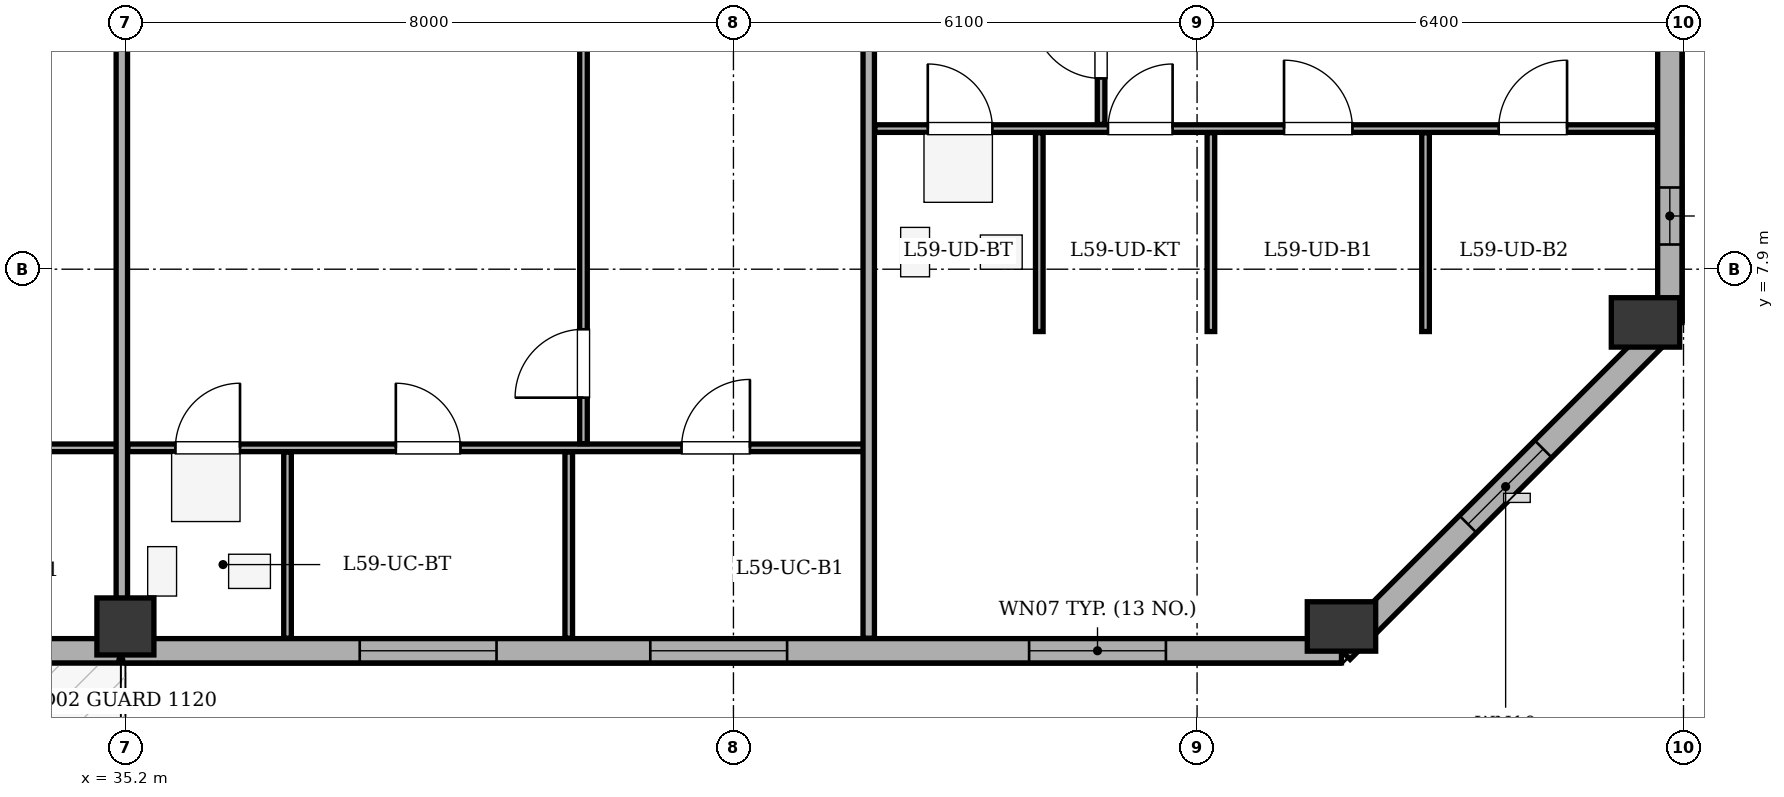
"""IFC4 building model, lengths in metres.
Left out: names, types, materials, properties, quantities, classifications, styles, units other than length and angle.
Written with IfcOpenShell. Run it as: python <this file> out.ifc"""

import sys

from ifc_helpers import new_model, si_unit, direction, frame, frame_2d, origin, origin_2d, place, context, subcontext, project, spatial, rectangle, extrude, element, fill, save


model = new_model("IFC4")
c1 = context("Model", 3, precision=1e-05, world=origin(), true_north=direction((0.0, 1.0)))
c2 = subcontext(c1, "Body", "Model", "MODEL_VIEW")
j1 = project(units=[si_unit("LENGTHUNIT", "METRE"), si_unit("PLANEANGLEUNIT", "RADIAN")], contexts=[c1])
p1 = place(None, origin())
s1 = spatial("IfcSite", under=j1, at=p1, CompositionType="ELEMENT")
p2 = place(p1, origin())
s2 = spatial("IfcBuilding", under=s1, at=p2, CompositionType="ELEMENT")
p3 = place(p2, frame((0.0, 0.0, 227.9)))
s3 = spatial("IfcBuildingStorey", under=s2, at=p3, CompositionType="ELEMENT", Elevation=227.9)
p4 = place(p3, frame((35.2, 3.2, 0.0), z_axis=(0.0, 0.0, 1.0), x_axis=(1.0, 0.0, 0.0)))
e1 = element("IfcColumn", 1, at=p4, inside=s3, PredefinedType="COLUMN", context=c2, shape_type="SweptSolid", body=[
    extrude(rectangle(XDim=0.75, YDim=0.75, at=origin_2d()), origin(), (0.0, 0.0, 1.0), 3.4),
])
for number, where, z_axis, x_axis in (
    (2, (51.2, 3.2, 0.0), (0.0, 0.0, 1.0), (1.0, 0.0, 0.0)),
    (3, (55.2, 7.2, 0.0), (0.0, 0.0, 1.0), (1.0, 0.0, 0.0)),
):
    element("IfcColumn", number, at=place(p3, frame(where, z_axis=z_axis, x_axis=x_axis)), inside=s3, PredefinedType="COLUMN", context=c2, shape_type="SweptSolid", body=[
        extrude(rectangle(XDim=0.65, YDim=0.9, at=origin_2d()), origin(), (0.0, 0.0, 1.0), 3.4),
    ])
p5 = place(p3, frame((51.2, 2.88, 0.0), z_axis=(0.0, 0.0, 1.0), x_axis=(-1.0, 0.0, 0.0)))
e4 = element("IfcWall", 4, at=p5, inside=s3, PredefinedType="STANDARD", context=c2, shape_type="SweptSolid", body=[
    extrude(rectangle(XDim=36.0, YDim=0.32, at=frame_2d((18.0, 0.0))), origin(), (0.0, 0.0, 1.0), 2.725),
])
p6 = place(p5, frame((18.9, 0.0, 0.0)))
e5 = element("IfcOpeningElement", 5, at=p6, cuts=e4, PredefinedType="OPENING", context=c2, shape_type="SweptSolid", body=[
    extrude(rectangle(XDim=1.0, YDim=2.02, at=frame_2d((0.5, 1.01))), frame((0.0, 0.17, 0.0), z_axis=(0.0, -1.0, 0.0), x_axis=(1.0, 0.0, 0.0)), (0.0, 0.0, 1.0), 0.34),
])
p7 = place(p5, frame((2.31, 0.0, 0.75)))
e6 = element("IfcOpeningElement", 6, at=p7, cuts=e4, PredefinedType="OPENING", context=c2, shape_type="SweptSolid", body=[
    extrude(rectangle(XDim=1.8, YDim=1.7, at=frame_2d((0.9, 0.85))), frame((0.0, 0.17, 0.0), z_axis=(0.0, -1.0, 0.0), x_axis=(1.0, 0.0, 0.0)), (0.0, 0.0, 1.0), 0.34),
])
p8 = place(p5, frame((7.294, 0.0, 0.75)))
e7 = element("IfcOpeningElement", 7, at=p8, cuts=e4, PredefinedType="OPENING", context=c2, shape_type="SweptSolid", body=[
    extrude(rectangle(XDim=1.8, YDim=1.7, at=frame_2d((0.9, 0.85))), frame((0.0, 0.17, 0.0), z_axis=(0.0, -1.0, 0.0), x_axis=(1.0, 0.0, 0.0)), (0.0, 0.0, 1.0), 0.34),
])
p9 = place(p5, frame((11.117, 0.0, 0.75)))
e8 = element("IfcOpeningElement", 8, at=p9, cuts=e4, PredefinedType="OPENING", context=c2, shape_type="SweptSolid", body=[
    extrude(rectangle(XDim=1.8, YDim=1.7, at=frame_2d((0.9, 0.85))), frame((0.0, 0.17, 0.0), z_axis=(0.0, -1.0, 0.0), x_axis=(1.0, 0.0, 0.0)), (0.0, 0.0, 1.0), 0.34),
])
p10 = place(p5, frame((27.473, 0.0, 0.75)))
e9 = element("IfcOpeningElement", 9, at=p10, cuts=e4, PredefinedType="OPENING", context=c2, shape_type="SweptSolid", body=[
    extrude(rectangle(XDim=1.8, YDim=1.7, at=frame_2d((0.9, 0.85))), frame((0.0, 0.17, 0.0), z_axis=(0.0, -1.0, 0.0), x_axis=(1.0, 0.0, 0.0)), (0.0, 0.0, 1.0), 0.34),
])
p11 = place(p5, frame((31.548, 0.0, 0.75)))
e10 = element("IfcOpeningElement", 10, at=p11, cuts=e4, PredefinedType="OPENING", context=c2, shape_type="SweptSolid", body=[
    extrude(rectangle(XDim=1.25, YDim=1.7, at=frame_2d((0.625, 0.85))), frame((0.0, 0.17, 0.0), z_axis=(0.0, -1.0, 0.0), x_axis=(1.0, 0.0, 0.0)), (0.0, 0.0, 1.0), 0.34),
])
p12 = place(p3, frame((55.52, 35.0, 0.0), z_axis=(0.0, 0.0, 1.0), x_axis=(0.0, -1.0, 0.0)))
e11 = element("IfcWall", 11, at=p12, inside=s3, PredefinedType="STANDARD", context=c2, shape_type="SweptSolid", body=[
    extrude(rectangle(XDim=27.8, YDim=0.32, at=frame_2d((13.9, 0.0))), origin(), (0.0, 0.0, 1.0), 2.725),
])
p13 = place(p12, frame((4.128, 0.0, 0.75)))
e12 = element("IfcOpeningElement", 12, at=p13, cuts=e11, PredefinedType="OPENING", context=c2, shape_type="SweptSolid", body=[
    extrude(rectangle(XDim=1.8, YDim=1.7, at=frame_2d((0.9, 0.85))), frame((0.0, 0.17, 0.0), z_axis=(0.0, -1.0, 0.0), x_axis=(1.0, 0.0, 0.0)), (0.0, 0.0, 1.0), 0.34),
])
p14 = place(p12, frame((9.472, 0.0, 0.75)))
e13 = element("IfcOpeningElement", 13, at=p14, cuts=e11, PredefinedType="OPENING", context=c2, shape_type="SweptSolid", body=[
    extrude(rectangle(XDim=2.2, YDim=1.7, at=frame_2d((1.1, 0.85))), frame((0.0, 0.17, 0.0), z_axis=(0.0, -1.0, 0.0), x_axis=(1.0, 0.0, 0.0)), (0.0, 0.0, 1.0), 0.34),
])
p15 = place(p12, frame((16.506, 0.0, 0.75)))
e14 = element("IfcOpeningElement", 14, at=p15, cuts=e11, PredefinedType="OPENING", context=c2, shape_type="SweptSolid", body=[
    extrude(rectangle(XDim=1.8, YDim=1.7, at=frame_2d((0.9, 0.85))), frame((0.0, 0.17, 0.0), z_axis=(0.0, -1.0, 0.0), x_axis=(1.0, 0.0, 0.0)), (0.0, 0.0, 1.0), 0.34),
])
p16 = place(p12, frame((21.069, 0.0, 0.75)))
e15 = element("IfcOpeningElement", 15, at=p16, cuts=e11, PredefinedType="OPENING", context=c2, shape_type="SweptSolid", body=[
    extrude(rectangle(XDim=2.2, YDim=1.7, at=frame_2d((1.1, 0.85))), frame((0.0, 0.17, 0.0), z_axis=(0.0, -1.0, 0.0), x_axis=(1.0, 0.0, 0.0)), (0.0, 0.0, 1.0), 0.34),
])
p17 = place(p12, frame((26.025, 0.0, 0.75)))
e16 = element("IfcOpeningElement", 16, at=p17, cuts=e11, PredefinedType="OPENING", context=c2, shape_type="SweptSolid", body=[
    extrude(rectangle(XDim=0.75, YDim=1.45, at=frame_2d((0.375, 0.725))), frame((0.0, 0.17, 0.0), z_axis=(0.0, -1.0, 0.0), x_axis=(1.0, 0.0, 0.0)), (0.0, 0.0, 1.0), 0.34),
])
p18 = place(p3, frame((55.52, 7.2, 0.0), z_axis=(0.0, 0.0, 1.0), x_axis=(-0.707106781187, -0.707106781187, 0.0)))
e17 = element("IfcWall", 17, at=p18, inside=s3, PredefinedType="STANDARD", context=c2, shape_type="SweptSolid", body=[
    extrude(rectangle(XDim=6.11, YDim=0.32, at=frame_2d((3.055, 0.0))), origin(), (0.0, 0.0, 1.0), 2.725),
])
p19 = place(p18, frame((2.355, 0.0, 0.75)))
e18 = element("IfcOpeningElement", 18, at=p19, cuts=e17, PredefinedType="OPENING", context=c2, shape_type="SweptSolid", body=[
    extrude(rectangle(XDim=1.4, YDim=1.65, at=frame_2d((0.7, 0.825))), frame((0.0, 0.17, 0.0), z_axis=(0.0, -1.0, 0.0), x_axis=(1.0, 0.0, 0.0)), (0.0, 0.0, 1.0), 0.34),
])
p20 = place(p3, frame((24.81, 5.55, 0.0), z_axis=(0.0, 0.0, 1.0), x_axis=(1.0, 0.0, 0.0)))
e19 = element("IfcWall", 19, at=p20, inside=s3, PredefinedType="PARTITIONING", context=c2, shape_type="SweptSolid", body=[
    extrude(rectangle(XDim=10.383, YDim=0.1, at=frame_2d((5.191, 0.0))), origin(), (0.0, 0.0, 1.0), 3.1),
])
p21 = place(p20, frame((0.625, 0.0, 0.0)))
e20 = element("IfcOpeningElement", 20, at=p21, cuts=e19, PredefinedType="OPENING", context=c2, shape_type="SweptSolid", body=[
    extrude(rectangle(XDim=0.85, YDim=2.05, at=frame_2d((0.425, 1.025))), frame((0.0, 0.06, 0.0), z_axis=(0.0, -1.0, 0.0), x_axis=(1.0, 0.0, 0.0)), (0.0, 0.0, 1.0), 0.12),
])
p22 = place(p20, frame((3.704, 0.0, 0.0)))
e21 = element("IfcOpeningElement", 21, at=p22, cuts=e19, PredefinedType="OPENING", context=c2, shape_type="SweptSolid", body=[
    extrude(rectangle(XDim=0.85, YDim=2.05, at=frame_2d((0.425, 1.025))), frame((0.0, 0.06, 0.0), z_axis=(0.0, -1.0, 0.0), x_axis=(1.0, 0.0, 0.0)), (0.0, 0.0, 1.0), 0.12),
])
p23 = place(p20, frame((7.761, 0.0, 0.0)))
e22 = element("IfcOpeningElement", 22, at=p23, cuts=e19, PredefinedType="OPENING", context=c2, shape_type="SweptSolid", body=[
    extrude(rectangle(XDim=0.9, YDim=2.05, at=frame_2d((0.45, 1.025))), frame((0.0, 0.06, 0.0), z_axis=(0.0, -1.0, 0.0), x_axis=(1.0, 0.0, 0.0)), (0.0, 0.0, 1.0), 0.12),
])
p24 = place(p3, frame((35.153, 3.045, 0.0), z_axis=(0.0, 0.0, 1.0), x_axis=(0.0, 1.0, 0.0)))
e23 = element("IfcWall", 23, at=p24, inside=s3, PredefinedType="PARTITIONING", context=c2, shape_type="SweptSolid", body=[
    extrude(rectangle(XDim=15.255, YDim=0.15, at=frame_2d((7.627, 0.0))), origin(), (0.0, 0.0, 1.0), 2.535),
])
p25 = place(p3, frame((35.233, 5.55, 0.0), z_axis=(0.0, 0.0, 1.0), x_axis=(1.0, 0.0, 0.0)))
e24 = element("IfcWall", 24, at=p25, inside=s3, PredefinedType="PARTITIONING", context=c2, shape_type="SweptSolid", body=[
    extrude(rectangle(XDim=9.787, YDim=0.1, at=frame_2d((4.894, 0.0))), origin(), (0.0, 0.0, 1.0), 3.1),
])
p26 = place(p25, frame((0.625, 0.0, 0.0)))
e25 = element("IfcOpeningElement", 25, at=p26, cuts=e24, PredefinedType="OPENING", context=c2, shape_type="SweptSolid", body=[
    extrude(rectangle(XDim=0.85, YDim=2.05, at=frame_2d((0.425, 1.025))), frame((0.0, 0.06, 0.0), z_axis=(0.0, -1.0, 0.0), x_axis=(1.0, 0.0, 0.0)), (0.0, 0.0, 1.0), 0.12),
])
p27 = place(p25, frame((3.525, 0.0, 0.0)))
e26 = element("IfcOpeningElement", 26, at=p27, cuts=e24, PredefinedType="OPENING", context=c2, shape_type="SweptSolid", body=[
    extrude(rectangle(XDim=0.85, YDim=2.05, at=frame_2d((0.425, 1.025))), frame((0.0, 0.06, 0.0), z_axis=(0.0, -1.0, 0.0), x_axis=(1.0, 0.0, 0.0)), (0.0, 0.0, 1.0), 0.12),
])
p28 = place(p25, frame((7.284, 0.0, 0.0)))
e27 = element("IfcOpeningElement", 27, at=p28, cuts=e24, PredefinedType="OPENING", context=c2, shape_type="SweptSolid", body=[
    extrude(rectangle(XDim=0.9, YDim=2.05, at=frame_2d((0.45, 1.025))), frame((0.0, 0.06, 0.0), z_axis=(0.0, -1.0, 0.0), x_axis=(1.0, 0.0, 0.0)), (0.0, 0.0, 1.0), 0.12),
])
p29 = place(p3, frame((41.227, 5.605, 0.0), z_axis=(0.0, 0.0, 1.0), x_axis=(0.0, 1.0, 0.0)))
e28 = element("IfcWall", 28, at=p29, inside=s3, PredefinedType="PARTITIONING", context=c2, shape_type="SweptSolid", body=[
    extrude(rectangle(XDim=12.695, YDim=0.1, at=frame_2d((6.348, 0.0))), origin(), (0.0, 0.0, 1.0), 3.1),
])
p30 = place(p29, frame((0.605, 0.0, 0.0)))
e29 = element("IfcOpeningElement", 29, at=p30, cuts=e28, PredefinedType="OPENING", context=c2, shape_type="SweptSolid", body=[
    extrude(rectangle(XDim=0.9, YDim=2.05, at=frame_2d((0.45, 1.025))), frame((0.0, 0.06, 0.0), z_axis=(0.0, -1.0, 0.0), x_axis=(1.0, 0.0, 0.0)), (0.0, 0.0, 1.0), 0.12),
])
for number, where, z_axis, x_axis in (
    (30, (37.333, 3.045, 0.0), (0.0, 0.0, 1.0), (0.0, 1.0, 0.0)),
    (31, (41.033, 3.045, 0.0), (0.0, 0.0, 1.0), (0.0, 1.0, 0.0)),
):
    element("IfcWall", number, at=place(p3, frame(where, z_axis=z_axis, x_axis=x_axis)), inside=s3, PredefinedType="PARTITIONING", context=c2, shape_type="SweptSolid", body=[
        extrude(rectangle(XDim=2.45, YDim=0.1, at=frame_2d((1.225, 0.0))), origin(), (0.0, 0.0, 1.0), 3.1),
    ])
p31 = place(p3, frame((44.98, 3.045, 0.0), z_axis=(0.0, 0.0, 1.0), x_axis=(0.0, 1.0, 0.0)))
e32 = element("IfcWall", 32, at=p31, inside=s3, PredefinedType="PARTITIONING", context=c2, shape_type="SweptSolid", body=[
    extrude(rectangle(XDim=15.255, YDim=0.15, at=frame_2d((7.627, 0.0))), origin(), (0.0, 0.0, 1.0), 2.725),
])
p32 = place(p3, frame((45.06, 9.75, 0.0), z_axis=(0.0, 0.0, 1.0), x_axis=(1.0, 0.0, 0.0)))
e33 = element("IfcWall", 33, at=p32, inside=s3, PredefinedType="PARTITIONING", context=c2, shape_type="SweptSolid", body=[
    extrude(rectangle(XDim=10.295, YDim=0.1, at=frame_2d((5.147, 0.0))), origin(), (0.0, 0.0, 1.0), 3.1),
])
p33 = place(p32, frame((0.697, 0.0, 0.0)))
e34 = element("IfcOpeningElement", 34, at=p33, cuts=e33, PredefinedType="OPENING", context=c2, shape_type="SweptSolid", body=[
    extrude(rectangle(XDim=0.85, YDim=2.05, at=frame_2d((0.425, 1.025))), frame((0.0, 0.06, 0.0), z_axis=(0.0, -1.0, 0.0), x_axis=(1.0, 0.0, 0.0)), (0.0, 0.0, 1.0), 0.12),
])
p34 = place(p32, frame((3.068, 0.0, 0.0)))
e35 = element("IfcOpeningElement", 35, at=p34, cuts=e33, PredefinedType="OPENING", context=c2, shape_type="SweptSolid", body=[
    extrude(rectangle(XDim=0.85, YDim=2.05, at=frame_2d((0.425, 1.025))), frame((0.0, 0.06, 0.0), z_axis=(0.0, -1.0, 0.0), x_axis=(1.0, 0.0, 0.0)), (0.0, 0.0, 1.0), 0.12),
])
p35 = place(p32, frame((5.384, 0.0, 0.0)))
e36 = element("IfcOpeningElement", 36, at=p35, cuts=e33, PredefinedType="OPENING", context=c2, shape_type="SweptSolid", body=[
    extrude(rectangle(XDim=0.9, YDim=2.05, at=frame_2d((0.45, 1.025))), frame((0.0, 0.06, 0.0), z_axis=(0.0, -1.0, 0.0), x_axis=(1.0, 0.0, 0.0)), (0.0, 0.0, 1.0), 0.12),
])
p36 = place(p32, frame((8.208, 0.0, 0.0)))
e37 = element("IfcOpeningElement", 37, at=p36, cuts=e33, PredefinedType="OPENING", context=c2, shape_type="SweptSolid", body=[
    extrude(rectangle(XDim=0.9, YDim=2.05, at=frame_2d((0.45, 1.025))), frame((0.0, 0.06, 0.0), z_axis=(0.0, -1.0, 0.0), x_axis=(1.0, 0.0, 0.0)), (0.0, 0.0, 1.0), 0.12),
])
p37 = place(p3, frame((48.037, 9.805, 0.0), z_axis=(0.0, 0.0, 1.0), x_axis=(0.0, 1.0, 0.0)))
e38 = element("IfcWall", 38, at=p37, inside=s3, PredefinedType="PARTITIONING", context=c2, shape_type="SweptSolid", body=[
    extrude(rectangle(XDim=27.065, YDim=0.1, at=frame_2d((13.533, 0.0))), origin(), (0.0, 0.0, 1.0), 3.1),
])
p38 = place(p37, frame((0.605, 0.0, 0.0)))
e39 = element("IfcOpeningElement", 39, at=p38, cuts=e38, PredefinedType="OPENING", context=c2, shape_type="SweptSolid", body=[
    extrude(rectangle(XDim=0.9, YDim=2.05, at=frame_2d((0.45, 1.025))), frame((0.0, 0.06, 0.0), z_axis=(0.0, -1.0, 0.0), x_axis=(1.0, 0.0, 0.0)), (0.0, 0.0, 1.0), 0.12),
])
for number, where, z_axis, x_axis in (
    (40, (47.224, 7.08, 0.0), (0.0, 0.0, 1.0), (0.0, 1.0, 0.0)),
    (41, (49.482, 7.08, 0.0), (0.0, 0.0, 1.0), (0.0, 1.0, 0.0)),
):
    element("IfcWall", number, at=place(p3, frame(where, z_axis=z_axis, x_axis=x_axis)), inside=s3, PredefinedType="PARTITIONING", context=c2, shape_type="SweptSolid", body=[
        extrude(rectangle(XDim=2.615, YDim=0.1, at=frame_2d((1.308, 0.0))), origin(), (0.0, 0.0, 1.0), 2.725),
    ])
p39 = place(p3, frame((52.306, 7.08, 0.0), z_axis=(0.0, 0.0, 1.0), x_axis=(0.0, 1.0, 0.0)))
e42 = element("IfcWall", 42, at=p39, inside=s3, PredefinedType="PARTITIONING", context=c2, shape_type="SweptSolid", body=[
    extrude(rectangle(XDim=2.615, YDim=0.1, at=frame_2d((1.308, 0.0))), origin(), (0.0, 0.0, 1.0), 3.1),
])
p40 = place(p7, origin())
e43 = element("IfcWindow", 43, at=p40, inside=s3, PartitioningType="SINGLE_PANEL", PredefinedType="WINDOW", context=c2, shape_type="SweptSolid", body=[
    extrude(rectangle(XDim=1.8, YDim=1.7, at=frame_2d((0.9, 0.85))), frame((0.0, -0.01, 0.0), z_axis=(0.0, -1.0, 0.0), x_axis=(1.0, 0.0, 0.0)), (0.0, 0.0, 1.0), 0.06),
])
fill(e6, e43)
p41 = place(p8, origin())
e44 = element("IfcWindow", 44, at=p41, inside=s3, PartitioningType="SINGLE_PANEL", PredefinedType="WINDOW", context=c2, shape_type="SweptSolid", body=[
    extrude(rectangle(XDim=1.8, YDim=1.7, at=frame_2d((0.9, 0.85))), frame((0.0, -0.01, 0.0), z_axis=(0.0, -1.0, 0.0), x_axis=(1.0, 0.0, 0.0)), (0.0, 0.0, 1.0), 0.06),
])
fill(e7, e44)
p42 = place(p9, origin())
e45 = element("IfcWindow", 45, at=p42, inside=s3, PartitioningType="SINGLE_PANEL", PredefinedType="WINDOW", context=c2, shape_type="SweptSolid", body=[
    extrude(rectangle(XDim=1.8, YDim=1.7, at=frame_2d((0.9, 0.85))), frame((0.0, -0.01, 0.0), z_axis=(0.0, -1.0, 0.0), x_axis=(1.0, 0.0, 0.0)), (0.0, 0.0, 1.0), 0.06),
])
fill(e8, e45)
p43 = place(p17, origin())
e46 = element("IfcWindow", 46, at=p43, inside=s3, PartitioningType="SINGLE_PANEL", PredefinedType="WINDOW", context=c2, shape_type="SweptSolid", body=[
    extrude(rectangle(XDim=0.75, YDim=1.45, at=frame_2d((0.375, 0.725))), frame((0.0, -0.01, 0.0), z_axis=(0.0, -1.0, 0.0), x_axis=(1.0, 0.0, 0.0)), (0.0, 0.0, 1.0), 0.06),
])
fill(e16, e46)
p44 = place(p19, origin())
e47 = element("IfcWindow", 47, at=p44, inside=s3, PartitioningType="SINGLE_PANEL", PredefinedType="WINDOW", context=c2, shape_type="SweptSolid", body=[
    extrude(rectangle(XDim=1.4, YDim=1.65, at=frame_2d((0.7, 0.825))), frame((0.0, -0.01, 0.0), z_axis=(0.0, -1.0, 0.0), x_axis=(1.0, 0.0, 0.0)), (0.0, 0.0, 1.0), 0.06),
])
fill(e18, e47)
p45 = place(p30, origin())
e48 = element("IfcDoor", 48, at=p45, inside=s3, OperationType="SINGLE_SWING_LEFT", PredefinedType="DOOR", context=c2, shape_type="SweptSolid", body=[
    extrude(rectangle(XDim=0.9, YDim=2.05, at=frame_2d((0.45, 1.025))), frame((0.0, 0.025, 0.0), z_axis=(0.0, -1.0, 0.0), x_axis=(1.0, 0.0, 0.0)), (0.0, 0.0, 1.0), 0.05),
])
fill(e29, e48)
p46 = place(p26, origin())
e49 = element("IfcDoor", 49, at=p46, inside=s3, OperationType="SINGLE_SWING_RIGHT", PredefinedType="DOOR", context=c2, shape_type="SweptSolid", body=[
    extrude(rectangle(XDim=0.85, YDim=2.05, at=frame_2d((0.425, 1.025))), frame((0.0, 0.025, 0.0), z_axis=(0.0, -1.0, 0.0), x_axis=(1.0, 0.0, 0.0)), (0.0, 0.0, 1.0), 0.05),
])
fill(e25, e49)
p47 = place(p27, origin())
e50 = element("IfcDoor", 50, at=p47, inside=s3, OperationType="SINGLE_SWING_LEFT", PredefinedType="DOOR", context=c2, shape_type="SweptSolid", body=[
    extrude(rectangle(XDim=0.85, YDim=2.05, at=frame_2d((0.425, 1.025))), frame((0.0, 0.025, 0.0), z_axis=(0.0, -1.0, 0.0), x_axis=(1.0, 0.0, 0.0)), (0.0, 0.0, 1.0), 0.05),
])
fill(e26, e50)
p48 = place(p28, origin())
e51 = element("IfcDoor", 51, at=p48, inside=s3, OperationType="SINGLE_SWING_RIGHT", PredefinedType="DOOR", context=c2, shape_type="SweptSolid", body=[
    extrude(rectangle(XDim=0.9, YDim=2.05, at=frame_2d((0.45, 1.025))), frame((0.0, 0.025, 0.0), z_axis=(0.0, -1.0, 0.0), x_axis=(1.0, 0.0, 0.0)), (0.0, 0.0, 1.0), 0.05),
])
fill(e27, e51)
p49 = place(p38, origin())
e52 = element("IfcDoor", 52, at=p49, inside=s3, OperationType="SINGLE_SWING_RIGHT", PredefinedType="DOOR", context=c2, shape_type="SweptSolid", body=[
    extrude(rectangle(XDim=0.9, YDim=2.05, at=frame_2d((0.45, 1.025))), frame((0.0, 0.025, 0.0), z_axis=(0.0, -1.0, 0.0), x_axis=(1.0, 0.0, 0.0)), (0.0, 0.0, 1.0), 0.05),
])
fill(e39, e52)
p50 = place(p33, origin())
e53 = element("IfcDoor", 53, at=p50, inside=s3, OperationType="SINGLE_SWING_LEFT", PredefinedType="DOOR", context=c2, shape_type="SweptSolid", body=[
    extrude(rectangle(XDim=0.85, YDim=2.05, at=frame_2d((0.425, 1.025))), frame((0.0, 0.025, 0.0), z_axis=(0.0, -1.0, 0.0), x_axis=(1.0, 0.0, 0.0)), (0.0, 0.0, 1.0), 0.05),
])
fill(e34, e53)
p51 = place(p34, origin())
e54 = element("IfcDoor", 54, at=p51, inside=s3, OperationType="SINGLE_SWING_RIGHT", PredefinedType="DOOR", context=c2, shape_type="SweptSolid", body=[
    extrude(rectangle(XDim=0.85, YDim=2.05, at=frame_2d((0.425, 1.025))), frame((0.0, 0.025, 0.0), z_axis=(0.0, -1.0, 0.0), x_axis=(1.0, 0.0, 0.0)), (0.0, 0.0, 1.0), 0.05),
])
fill(e35, e54)
p52 = place(p35, origin())
e55 = element("IfcDoor", 55, at=p52, inside=s3, OperationType="SINGLE_SWING_LEFT", PredefinedType="DOOR", context=c2, shape_type="SweptSolid", body=[
    extrude(rectangle(XDim=0.9, YDim=2.05, at=frame_2d((0.45, 1.025))), frame((0.0, 0.025, 0.0), z_axis=(0.0, -1.0, 0.0), x_axis=(1.0, 0.0, 0.0)), (0.0, 0.0, 1.0), 0.05),
])
fill(e36, e55)
p53 = place(p36, origin())
e56 = element("IfcDoor", 56, at=p53, inside=s3, OperationType="SINGLE_SWING_RIGHT", PredefinedType="DOOR", context=c2, shape_type="SweptSolid", body=[
    extrude(rectangle(XDim=0.9, YDim=2.05, at=frame_2d((0.45, 1.025))), frame((0.0, 0.025, 0.0), z_axis=(0.0, -1.0, 0.0), x_axis=(1.0, 0.0, 0.0)), (0.0, 0.0, 1.0), 0.05),
])
fill(e37, e56)
save(model, sys.argv[1])
